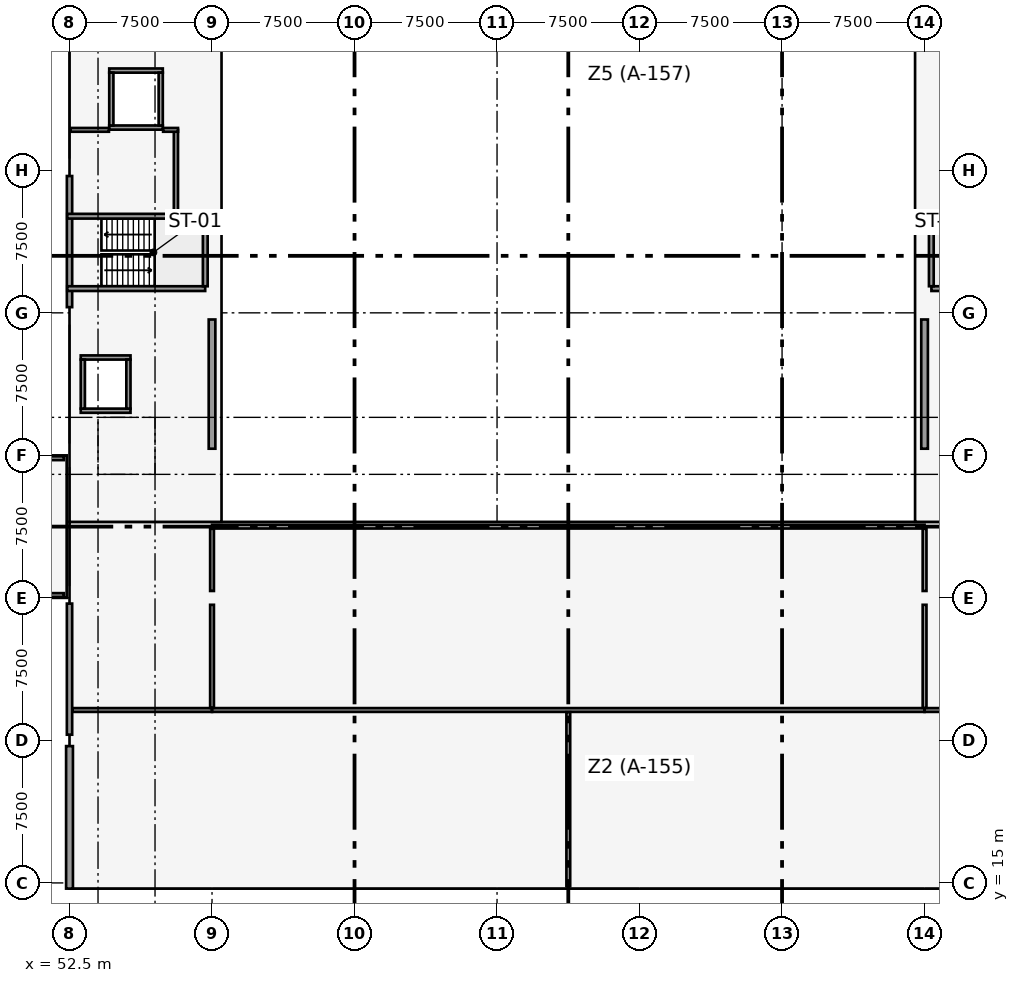
"""IFC4 building model, lengths in metres.
Left out: names, types, materials, properties, quantities, classifications, styles, units other than length and angle.
Written with IfcOpenShell. Run it as: python <this file> out.ifc"""

import sys

from ifc_helpers import new_model, si_unit, direction, frame, frame_2d, origin, origin_2d, place, context, subcontext, project, spatial, rectangle, extrude, element, fill, save


model = new_model("IFC4")
c1 = context("Model", 3, precision=1e-05, world=origin(), true_north=direction((0.0, 1.0)))
c2 = subcontext(c1, "Body", "Model", "MODEL_VIEW")
j1 = project(units=[si_unit("LENGTHUNIT", "METRE"), si_unit("PLANEANGLEUNIT", "RADIAN")], contexts=[c1])
p1 = place(None, origin())
s1 = spatial("IfcSite", under=j1, at=p1, CompositionType="ELEMENT")
p2 = place(p1, origin())
s2 = spatial("IfcBuilding", under=s1, at=p2, CompositionType="ELEMENT")
p3 = place(p2, frame((0.0, 0.0, 17.1)))
s3 = spatial("IfcBuildingStorey", under=s2, at=p3, CompositionType="ELEMENT", Elevation=17.1)
p4 = place(p3, frame((52.5, 22.5, 0.0), z_axis=(0.0, 0.0, 1.0), x_axis=(1.0, 0.0, 0.0)))
e1 = element("IfcColumn", 1, at=p4, inside=s3, PredefinedType="COLUMN", context=c2, shape_type="SweptSolid", body=[
    extrude(rectangle(XDim=0.6, YDim=1.1, at=origin_2d()), origin(), (0.0, 0.0, 1.0), 3.9),
])
for number, where, z_axis, x_axis in (
    (2, (52.5, 30.0, 0.0), (0.0, 0.0, 1.0), (1.0, 0.0, 0.0)),
    (3, (52.5, 37.5, 0.0), (0.0, 0.0, 1.0), (1.0, 0.0, 0.0)),
    (4, (52.5, 45.0, 0.0), (0.0, 0.0, 1.0), (1.0, 0.0, 0.0)),
    (5, (52.5, 52.5, 0.0), (0.0, 0.0, 1.0), (1.0, 0.0, 0.0)),
    (6, (60.0, 22.5, 0.0), (0.0, 0.0, 1.0), (1.0, 0.0, 0.0)),
    (7, (60.0, 30.0, 0.0), (0.0, 0.0, 1.0), (1.0, 0.0, 0.0)),
    (8, (60.0, 37.5, 0.0), (0.0, 0.0, 1.0), (1.0, 0.0, 0.0)),
    (9, (60.0, 45.0, 0.0), (0.0, 0.0, 1.0), (1.0, 0.0, 0.0)),
    (10, (60.0, 52.5, 0.0), (0.0, 0.0, 1.0), (1.0, 0.0, 0.0)),
    (11, (75.0, 22.5, 0.0), (0.0, 0.0, 1.0), (1.0, 0.0, 0.0)),
    (12, (75.0, 30.0, 0.0), (0.0, 0.0, 1.0), (1.0, 0.0, 0.0)),
    (13, (90.0, 22.5, 0.0), (0.0, 0.0, 1.0), (1.0, 0.0, 0.0)),
    (14, (90.0, 30.0, 0.0), (0.0, 0.0, 1.0), (1.0, 0.0, 0.0)),
    (15, (97.5, 22.5, 0.0), (0.0, 0.0, 1.0), (1.0, 0.0, 0.0)),
    (16, (97.5, 30.0, 0.0), (0.0, 0.0, 1.0), (1.0, 0.0, 0.0)),
    (17, (97.5, 37.5, 0.0), (0.0, 0.0, 1.0), (1.0, 0.0, 0.0)),
    (18, (97.5, 45.0, 0.0), (0.0, 0.0, 1.0), (1.0, 0.0, 0.0)),
    (19, (97.5, 52.5, 0.0), (0.0, 0.0, 1.0), (1.0, 0.0, 0.0)),
):
    element("IfcColumn", number, at=place(p3, frame(where, z_axis=z_axis, x_axis=x_axis)), inside=s3, PredefinedType="COLUMN", context=c2, shape_type="SweptSolid", body=[
        extrude(rectangle(XDim=0.7, YDim=0.7, at=origin_2d()), origin(), (0.0, 0.0, 1.0), 3.9),
    ])
for number, where, z_axis, x_axis in (
    (20, (60.0, 37.85, 0.0), (0.0, 0.0, 1.0), (0.0, 1.0, 0.0)),
    (21, (97.5, 37.85, 0.0), (0.0, 0.0, 1.0), (0.0, 1.0, 0.0)),
):
    element("IfcWall", number, at=place(p3, frame(where, z_axis=z_axis, x_axis=x_axis)), inside=s3, PredefinedType="SHEAR", context=c2, shape_type="SweptSolid", body=[
        extrude(rectangle(XDim=6.8, YDim=0.35, at=frame_2d((3.4, 0.0))), origin(), (0.0, 0.0, 1.0), 2.42),
    ])
p5 = place(p3, frame((52.5, 14.7, 0.0), z_axis=(0.0, 0.0, 1.0), x_axis=(0.0, 1.0, 0.0)))
e22 = element("IfcWall", 22, at=p5, inside=s3, PredefinedType="SOLIDWALL", context=c2, shape_type="SweptSolid", body=[
    extrude(rectangle(XDim=7.5, YDim=0.36, at=frame_2d((3.75, 0.0))), origin(), (0.0, 0.0, 1.0), 2.39),
])
p6 = place(p3, frame((52.5, 22.8, 0.0), z_axis=(0.0, 0.0, 1.0), x_axis=(0.0, 1.0, 0.0)))
e23 = element("IfcWall", 23, at=p6, inside=s3, PredefinedType="SOLIDWALL", context=c2, shape_type="SweptSolid", body=[
    extrude(rectangle(XDim=6.9, YDim=0.28, at=frame_2d((3.45, 0.0))), origin(), (0.0, 0.0, 1.0), 2.39),
])
p7 = place(p3, frame((52.5, 45.3, 0.0), z_axis=(0.0, 0.0, 1.0), x_axis=(0.0, 1.0, 0.0)))
e24 = element("IfcWall", 24, at=p7, inside=s3, PredefinedType="SOLIDWALL", context=c2, shape_type="SweptSolid", body=[
    extrude(rectangle(XDim=6.9, YDim=0.28, at=frame_2d((3.45, 0.0))), origin(), (0.0, 0.0, 1.0), 2.64),
])
for number, where, z_axis, x_axis in (
    (25, (37.8, 30.15, 0.55), (0.0, 0.0, 1.0), (1.0, 0.0, 0.0)),
    (26, (37.8, 37.35, 0.55), (0.0, 0.0, 1.0), (1.0, 0.0, 0.0)),
):
    element("IfcWall", number, at=place(p3, frame(where, z_axis=z_axis, x_axis=x_axis)), inside=s3, PredefinedType="PARAPET", context=c2, shape_type="SweptSolid", body=[
        extrude(rectangle(XDim=14.4, YDim=0.2, at=frame_2d((7.2, 0.0))), origin(), (0.0, 0.0, 1.0), 1.12),
    ])
p8 = place(p3, frame((52.38, 46.275, 0.0), z_axis=(0.0, 0.0, 1.0), x_axis=(1.0, 0.0, 0.0)))
e27 = element("IfcWall", 27, at=p8, inside=s3, PredefinedType="SOLIDWALL", context=c2, shape_type="SweptSolid", body=[
    extrude(rectangle(XDim=7.26, YDim=0.25, at=frame_2d((3.63, 0.0))), origin(), (0.0, 0.0, 1.0), 3.62),
])
p9 = place(p8, frame((0.62, 0.0, 0.0)))
e28 = element("IfcOpeningElement", 28, at=p9, cuts=e27, PredefinedType="OPENING", context=c2, shape_type="SweptSolid", body=[
    extrude(rectangle(XDim=1.1, YDim=2.15, at=frame_2d((0.55, 1.075))), frame((0.0, 0.135, 0.0), z_axis=(0.0, -1.0, 0.0), x_axis=(1.0, 0.0, 0.0)), (0.0, 0.0, 1.0), 0.27),
])
p10 = place(p3, frame((52.38, 50.085, 0.0), z_axis=(0.0, 0.0, 1.0), x_axis=(1.0, 0.0, 0.0)))
e29 = element("IfcWall", 29, at=p10, inside=s3, PredefinedType="SOLIDWALL", context=c2, shape_type="SweptSolid", body=[
    extrude(rectangle(XDim=7.26, YDim=0.25, at=frame_2d((3.63, 0.0))), origin(), (0.0, 0.0, 1.0), 3.62),
])
p11 = place(p10, frame((0.62, 0.0, 0.0)))
e30 = element("IfcOpeningElement", 30, at=p11, cuts=e29, PredefinedType="OPENING", context=c2, shape_type="SweptSolid", body=[
    extrude(rectangle(XDim=1.1, YDim=2.15, at=frame_2d((0.55, 1.075))), frame((0.0, 0.135, 0.0), z_axis=(0.0, -1.0, 0.0), x_axis=(1.0, 0.0, 0.0)), (0.0, 0.0, 1.0), 0.27),
])
p12 = place(p3, frame((59.645, 46.4, 0.0), z_axis=(0.0, 0.0, 1.0), x_axis=(0.0, 1.0, 0.0)))
e31 = element("IfcWall", 31, at=p12, inside=s3, PredefinedType="SOLIDWALL", context=c2, shape_type="SweptSolid", body=[
    extrude(rectangle(XDim=3.56, YDim=0.25, at=frame_2d((1.78, 0.0))), origin(), (0.0, 0.0, 1.0), 3.62),
])
p13 = place(p3, frame((97.86, 46.275, 0.0), z_axis=(0.0, 0.0, 1.0), x_axis=(1.0, 0.0, 0.0)))
e32 = element("IfcWall", 32, at=p13, inside=s3, PredefinedType="SOLIDWALL", context=c2, shape_type="SweptSolid", body=[
    extrude(rectangle(XDim=7.26, YDim=0.25, at=frame_2d((3.63, 0.0))), origin(), (0.0, 0.0, 1.0), 3.62),
])
p14 = place(p13, frame((5.54, 0.0, 0.0)))
e33 = element("IfcOpeningElement", 33, at=p14, cuts=e32, PredefinedType="OPENING", context=c2, shape_type="SweptSolid", body=[
    extrude(rectangle(XDim=1.1, YDim=2.15, at=frame_2d((0.55, 1.075))), frame((0.0, 0.135, 0.0), z_axis=(0.0, -1.0, 0.0), x_axis=(1.0, 0.0, 0.0)), (0.0, 0.0, 1.0), 0.27),
])
p15 = place(p3, frame((97.86, 50.085, 0.0), z_axis=(0.0, 0.0, 1.0), x_axis=(1.0, 0.0, 0.0)))
e34 = element("IfcWall", 34, at=p15, inside=s3, PredefinedType="SOLIDWALL", context=c2, shape_type="SweptSolid", body=[
    extrude(rectangle(XDim=7.26, YDim=0.25, at=frame_2d((3.63, 0.0))), origin(), (0.0, 0.0, 1.0), 3.62),
])
p16 = place(p15, frame((5.54, 0.0, 0.0)))
e35 = element("IfcOpeningElement", 35, at=p16, cuts=e34, PredefinedType="OPENING", context=c2, shape_type="SweptSolid", body=[
    extrude(rectangle(XDim=1.1, YDim=2.15, at=frame_2d((0.55, 1.075))), frame((0.0, 0.135, 0.0), z_axis=(0.0, -1.0, 0.0), x_axis=(1.0, 0.0, 0.0)), (0.0, 0.0, 1.0), 0.27),
])
p17 = place(p3, frame((97.855, 46.4, 0.0), z_axis=(0.0, 0.0, 1.0), x_axis=(0.0, 1.0, 0.0)))
e36 = element("IfcWall", 36, at=p17, inside=s3, PredefinedType="SOLIDWALL", context=c2, shape_type="SweptSolid", body=[
    extrude(rectangle(XDim=3.56, YDim=0.25, at=frame_2d((1.78, 0.0))), origin(), (0.0, 0.0, 1.0), 3.62),
])
for number, where, z_axis, x_axis in (
    (37, (53.09, 39.85, 0.0), (0.0, 0.0, 1.0), (1.0, 0.0, 0.0)),
    (38, (53.09, 42.65, 0.0), (0.0, 0.0, 1.0), (1.0, 0.0, 0.0)),
):
    element("IfcWall", number, at=place(p3, frame(where, z_axis=z_axis, x_axis=x_axis)), inside=s3, PredefinedType="SOLIDWALL", context=c2, shape_type="SweptSolid", body=[
        extrude(rectangle(XDim=2.62, YDim=0.22, at=frame_2d((1.31, 0.0))), origin(), (0.0, 0.0, 1.0), 3.62),
    ])
p18 = place(p3, frame((53.2, 39.96, 0.0), z_axis=(0.0, 0.0, 1.0), x_axis=(0.0, 1.0, 0.0)))
e39 = element("IfcWall", 39, at=p18, inside=s3, PredefinedType="SOLIDWALL", context=c2, shape_type="SweptSolid", body=[
    extrude(rectangle(XDim=2.58, YDim=0.22, at=frame_2d((1.29, 0.0))), origin(), (0.0, 0.0, 1.0), 3.62),
])
p19 = place(p3, frame((55.6, 39.96, 0.0), z_axis=(0.0, 0.0, 1.0), x_axis=(0.0, 1.0, 0.0)))
e40 = element("IfcWall", 40, at=p19, inside=s3, PredefinedType="SOLIDWALL", context=c2, shape_type="SweptSolid", body=[
    extrude(rectangle(XDim=2.58, YDim=0.22, at=frame_2d((1.29, 0.0))), origin(), (0.0, 0.0, 1.0), 3.62),
])
p20 = place(p19, frame((0.79, 0.0, 0.0)))
e41 = element("IfcOpeningElement", 41, at=p20, cuts=e40, PredefinedType="OPENING", context=c2, shape_type="SweptSolid", body=[
    extrude(rectangle(XDim=1.0, YDim=2.15, at=frame_2d((0.5, 1.075))), frame((0.0, 0.12, 0.0), z_axis=(0.0, -1.0, 0.0), x_axis=(1.0, 0.0, 0.0)), (0.0, 0.0, 1.0), 0.24),
])
p21 = place(p3, frame((54.59, 54.75, 0.0), z_axis=(0.0, 0.0, 1.0), x_axis=(1.0, 0.0, 0.0)))
e42 = element("IfcWall", 42, at=p21, inside=s3, PredefinedType="SOLIDWALL", context=c2, shape_type="SweptSolid", body=[
    extrude(rectangle(XDim=2.82, YDim=0.22, at=frame_2d((1.41, 0.0))), origin(), (0.0, 0.0, 1.0), 3.62),
])
p22 = place(p21, frame((0.86, 0.0, 0.0)))
e43 = element("IfcOpeningElement", 43, at=p22, cuts=e42, PredefinedType="OPENING", context=c2, shape_type="SweptSolid", body=[
    extrude(rectangle(XDim=1.1, YDim=2.15, at=frame_2d((0.55, 1.075))), frame((0.0, 0.12, 0.0), z_axis=(0.0, -1.0, 0.0), x_axis=(1.0, 0.0, 0.0)), (0.0, 0.0, 1.0), 0.24),
])
p23 = place(p3, frame((54.59, 57.75, 0.0), z_axis=(0.0, 0.0, 1.0), x_axis=(1.0, 0.0, 0.0)))
e44 = element("IfcWall", 44, at=p23, inside=s3, PredefinedType="SOLIDWALL", context=c2, shape_type="SweptSolid", body=[
    extrude(rectangle(XDim=2.82, YDim=0.22, at=frame_2d((1.41, 0.0))), origin(), (0.0, 0.0, 1.0), 3.62),
])
for number, where, z_axis, x_axis in (
    (45, (54.7, 54.86, 0.0), (0.0, 0.0, 1.0), (0.0, 1.0, 0.0)),
    (46, (57.3, 54.86, 0.0), (0.0, 0.0, 1.0), (0.0, 1.0, 0.0)),
):
    element("IfcWall", number, at=place(p3, frame(where, z_axis=z_axis, x_axis=x_axis)), inside=s3, PredefinedType="SOLIDWALL", context=c2, shape_type="SweptSolid", body=[
        extrude(rectangle(XDim=2.78, YDim=0.22, at=frame_2d((1.39, 0.0))), origin(), (0.0, 0.0, 1.0), 3.62),
    ])
p24 = place(p3, frame((58.1, 50.22, 0.0), z_axis=(0.0, 0.0, 1.0), x_axis=(0.0, 1.0, 0.0)))
e47 = element("IfcWall", 47, at=p24, inside=s3, PredefinedType="SOLIDWALL", context=c2, shape_type="SweptSolid", body=[
    extrude(rectangle(XDim=4.41, YDim=0.22, at=frame_2d((2.205, 0.0))), origin(), (0.0, 0.0, 1.0), 3.62),
])
p25 = place(p24, frame((0.45, 0.0, 0.0)))
e48 = element("IfcOpeningElement", 48, at=p25, cuts=e47, PredefinedType="OPENING", context=c2, shape_type="SweptSolid", body=[
    extrude(rectangle(XDim=1.1, YDim=2.15, at=frame_2d((0.55, 1.075))), frame((0.0, 0.12, 0.0), z_axis=(0.0, -1.0, 0.0), x_axis=(1.0, 0.0, 0.0)), (0.0, 0.0, 1.0), 0.24),
])
p26 = place(p3, frame((52.56, 54.63, 0.0), z_axis=(0.0, 0.0, 1.0), x_axis=(1.0, 0.0, 0.0)))
e49 = element("IfcWall", 49, at=p26, inside=s3, PredefinedType="PARTITIONING", context=c2, shape_type="SweptSolid", body=[
    extrude(rectangle(XDim=2.015, YDim=0.2, at=frame_2d((1.007, 0.0))), origin(), (0.0, 0.0, 1.0), 2.85),
])
p27 = place(p3, frame((57.425, 54.63, 0.0), z_axis=(0.0, 0.0, 1.0), x_axis=(1.0, 0.0, 0.0)))
e50 = element("IfcWall", 50, at=p27, inside=s3, PredefinedType="PARTITIONING", context=c2, shape_type="SweptSolid", body=[
    extrude(rectangle(XDim=0.785, YDim=0.2, at=frame_2d((0.393, 0.0))), origin(), (0.0, 0.0, 1.0), 3.6),
])
p28 = place(p3, frame((52.654, 24.1, 0.0), z_axis=(0.0, 0.0, 1.0), x_axis=(1.0, 0.0, 0.0)))
e51 = element("IfcWall", 51, at=p28, inside=s3, PredefinedType="PARTITIONING", context=c2, shape_type="SweptSolid", body=[
    extrude(rectangle(XDim=7.346, YDim=0.2, at=frame_2d((3.673, 0.0))), origin(), (0.0, 0.0, 1.0), 2.39),
])
p29 = place(p28, frame((2.996, 0.0, 0.0)))
e52 = element("IfcOpeningElement", 52, at=p29, cuts=e51, PredefinedType="OPENING", context=c2, shape_type="SweptSolid", body=[
    extrude(rectangle(XDim=1.2, YDim=2.15, at=frame_2d((0.6, 1.075))), frame((0.0, 0.11, 0.0), z_axis=(0.0, -1.0, 0.0), x_axis=(1.0, 0.0, 0.0)), (0.0, 0.0, 1.0), 0.22),
])
p30 = place(p3, frame((97.5, 24.1, 0.0), z_axis=(0.0, 0.0, 1.0), x_axis=(1.0, 0.0, 0.0)))
e53 = element("IfcWall", 53, at=p30, inside=s3, PredefinedType="PARTITIONING", context=c2, shape_type="SweptSolid", body=[
    extrude(rectangle(XDim=7.346, YDim=0.2, at=frame_2d((3.673, 0.0))), origin(), (0.0, 0.0, 1.0), 2.39),
])
p31 = place(p30, frame((3.15, 0.0, 0.0)))
e54 = element("IfcOpeningElement", 54, at=p31, cuts=e53, PredefinedType="OPENING", context=c2, shape_type="SweptSolid", body=[
    extrude(rectangle(XDim=1.2, YDim=2.15, at=frame_2d((0.6, 1.075))), frame((0.0, 0.11, 0.0), z_axis=(0.0, -1.0, 0.0), x_axis=(1.0, 0.0, 0.0)), (0.0, 0.0, 1.0), 0.22),
])
for number, where, z_axis, x_axis in (
    (55, (60.0, 24.1, 0.0), (0.0, 0.0, 1.0), (1.0, 0.0, 0.0)),
    (56, (60.0, 33.75, 0.0), (0.0, 0.0, 1.0), (1.0, 0.0, 0.0)),
):
    element("IfcWall", number, at=place(p3, frame(where, z_axis=z_axis, x_axis=x_axis)), inside=s3, PredefinedType="PARTITIONING", context=c2, shape_type="SweptSolid", body=[
        extrude(rectangle(XDim=37.5, YDim=0.2, at=frame_2d((18.75, 0.0))), origin(), (0.0, 0.0, 1.0), 2.39),
    ])
p32 = place(p3, frame((78.75, 14.832, 0.0), z_axis=(0.0, 0.0, 1.0), x_axis=(0.0, 1.0, 0.0)))
e57 = element("IfcWall", 57, at=p32, inside=s3, PredefinedType="PARTITIONING", context=c2, shape_type="SweptSolid", body=[
    extrude(rectangle(XDim=9.154, YDim=0.2, at=frame_2d((4.577, 0.0))), origin(), (0.0, 0.0, 1.0), 2.59),
])
p33 = place(p32, frame((3.718, 0.0, 0.0)))
e58 = element("IfcOpeningElement", 58, at=p33, cuts=e57, PredefinedType="OPENING", context=c2, shape_type="SweptSolid", body=[
    extrude(rectangle(XDim=1.3, YDim=2.15, at=frame_2d((0.65, 1.075))), frame((0.0, 0.11, 0.0), z_axis=(0.0, -1.0, 0.0), x_axis=(1.0, 0.0, 0.0)), (0.0, 0.0, 1.0), 0.22),
])
p34 = place(p3, frame((60.0, 24.214, 0.0), z_axis=(0.0, 0.0, 1.0), x_axis=(0.0, 1.0, 0.0)))
e59 = element("IfcWall", 59, at=p34, inside=s3, PredefinedType="PARTITIONING", context=c2, shape_type="SweptSolid", body=[
    extrude(rectangle(XDim=5.422, YDim=0.2, at=frame_2d((2.711, 0.0))), origin(), (0.0, 0.0, 1.0), 2.39),
])
p35 = place(p34, frame((2.186, 0.0, 0.0)))
e60 = element("IfcOpeningElement", 60, at=p35, cuts=e59, PredefinedType="OPENING", context=c2, shape_type="SweptSolid", body=[
    extrude(rectangle(XDim=1.2, YDim=2.15, at=frame_2d((0.6, 1.075))), frame((0.0, 0.11, 0.0), z_axis=(0.0, -1.0, 0.0), x_axis=(1.0, 0.0, 0.0)), (0.0, 0.0, 1.0), 0.22),
])
p36 = place(p3, frame((60.0, 30.364, 0.0), z_axis=(0.0, 0.0, 1.0), x_axis=(0.0, 1.0, 0.0)))
e61 = element("IfcWall", 61, at=p36, inside=s3, PredefinedType="PARTITIONING", context=c2, shape_type="SweptSolid", body=[
    extrude(rectangle(XDim=3.272, YDim=0.2, at=frame_2d((1.636, 0.0))), origin(), (0.0, 0.0, 1.0), 2.39),
])
p37 = place(p3, frame((97.5, 24.214, 0.0), z_axis=(0.0, 0.0, 1.0), x_axis=(0.0, 1.0, 0.0)))
e62 = element("IfcWall", 62, at=p37, inside=s3, PredefinedType="PARTITIONING", context=c2, shape_type="SweptSolid", body=[
    extrude(rectangle(XDim=5.422, YDim=0.2, at=frame_2d((2.711, 0.0))), origin(), (0.0, 0.0, 1.0), 2.39),
])
p38 = place(p37, frame((2.186, 0.0, 0.0)))
e63 = element("IfcOpeningElement", 63, at=p38, cuts=e62, PredefinedType="OPENING", context=c2, shape_type="SweptSolid", body=[
    extrude(rectangle(XDim=1.2, YDim=2.15, at=frame_2d((0.6, 1.075))), frame((0.0, 0.11, 0.0), z_axis=(0.0, -1.0, 0.0), x_axis=(1.0, 0.0, 0.0)), (0.0, 0.0, 1.0), 0.22),
])
p39 = place(p3, frame((97.5, 30.364, 0.0), z_axis=(0.0, 0.0, 1.0), x_axis=(0.0, 1.0, 0.0)))
e64 = element("IfcWall", 64, at=p39, inside=s3, PredefinedType="PARTITIONING", context=c2, shape_type="SweptSolid", body=[
    extrude(rectangle(XDim=3.272, YDim=0.2, at=frame_2d((1.636, 0.0))), origin(), (0.0, 0.0, 1.0), 2.39),
])
p40 = place(p9, origin())
e65 = element("IfcDoor", 65, at=p40, inside=s3, OperationType="SINGLE_SWING_LEFT", PredefinedType="DOOR", context=c2, shape_type="SweptSolid", body=[
    extrude(rectangle(XDim=1.1, YDim=2.15, at=frame_2d((0.55, 1.075))), frame((0.0, 0.025, 0.0), z_axis=(0.0, -1.0, 0.0), x_axis=(1.0, 0.0, 0.0)), (0.0, 0.0, 1.0), 0.05),
])
fill(e28, e65)
p41 = place(p11, frame((1.1, 0.0, 0.0), z_axis=(0.0, 0.0, 1.0), x_axis=(-1.0, 0.0, 0.0)))
e66 = element("IfcDoor", 66, at=p41, inside=s3, OperationType="SINGLE_SWING_RIGHT", PredefinedType="DOOR", context=c2, shape_type="SweptSolid", body=[
    extrude(rectangle(XDim=1.1, YDim=2.15, at=frame_2d((0.55, 1.075))), frame((0.0, 0.025, 0.0), z_axis=(0.0, -1.0, 0.0), x_axis=(1.0, 0.0, 0.0)), (0.0, 0.0, 1.0), 0.05),
])
fill(e30, e66)
p42 = place(p20, origin())
e67 = element("IfcDoor", 67, at=p42, inside=s3, OperationType="SLIDING_TO_LEFT", PredefinedType="DOOR", context=c2, shape_type="SweptSolid", body=[
    extrude(rectangle(XDim=1.0, YDim=2.15, at=frame_2d((0.5, 1.075))), frame((0.0, 0.025, 0.0), z_axis=(0.0, -1.0, 0.0), x_axis=(1.0, 0.0, 0.0)), (0.0, 0.0, 1.0), 0.05),
])
fill(e41, e67)
p43 = place(p22, origin())
e68 = element("IfcDoor", 68, at=p43, inside=s3, OperationType="SLIDING_TO_LEFT", PredefinedType="DOOR", context=c2, shape_type="SweptSolid", body=[
    extrude(rectangle(XDim=1.1, YDim=2.15, at=frame_2d((0.55, 1.075))), frame((0.0, 0.025, 0.0), z_axis=(0.0, -1.0, 0.0), x_axis=(1.0, 0.0, 0.0)), (0.0, 0.0, 1.0), 0.05),
])
fill(e43, e68)
p44 = place(p25, origin())
e69 = element("IfcDoor", 69, at=p44, inside=s3, OperationType="SINGLE_SWING_RIGHT", PredefinedType="DOOR", context=c2, shape_type="SweptSolid", body=[
    extrude(rectangle(XDim=1.1, YDim=2.15, at=frame_2d((0.55, 1.075))), frame((0.0, 0.025, 0.0), z_axis=(0.0, -1.0, 0.0), x_axis=(1.0, 0.0, 0.0)), (0.0, 0.0, 1.0), 0.05),
])
fill(e48, e69)
p45 = place(p29, origin())
e70 = element("IfcDoor", 70, at=p45, inside=s3, OperationType="SINGLE_SWING_RIGHT", PredefinedType="DOOR", context=c2, shape_type="SweptSolid", body=[
    extrude(rectangle(XDim=1.2, YDim=2.15, at=frame_2d((0.6, 1.075))), frame((0.0, 0.025, 0.0), z_axis=(0.0, -1.0, 0.0), x_axis=(1.0, 0.0, 0.0)), (0.0, 0.0, 1.0), 0.05),
])
fill(e52, e70)
p46 = place(p33, origin())
e71 = element("IfcDoor", 71, at=p46, inside=s3, OperationType="SINGLE_SWING_RIGHT", PredefinedType="DOOR", context=c2, shape_type="SweptSolid", body=[
    extrude(rectangle(XDim=1.3, YDim=2.15, at=frame_2d((0.65, 1.075))), frame((0.0, 0.025, 0.0), z_axis=(0.0, -1.0, 0.0), x_axis=(1.0, 0.0, 0.0)), (0.0, 0.0, 1.0), 0.05),
])
fill(e58, e71)
p47 = place(p35, origin())
e72 = element("IfcDoor", 72, at=p47, inside=s3, OperationType="SINGLE_SWING_LEFT", PredefinedType="DOOR", context=c2, shape_type="SweptSolid", body=[
    extrude(rectangle(XDim=1.2, YDim=2.15, at=frame_2d((0.6, 1.075))), frame((0.0, 0.025, 0.0), z_axis=(0.0, -1.0, 0.0), x_axis=(1.0, 0.0, 0.0)), (0.0, 0.0, 1.0), 0.05),
])
fill(e60, e72)
p48 = place(p38, origin())
e73 = element("IfcDoor", 73, at=p48, inside=s3, OperationType="SINGLE_SWING_RIGHT", PredefinedType="DOOR", context=c2, shape_type="SweptSolid", body=[
    extrude(rectangle(XDim=1.2, YDim=2.15, at=frame_2d((0.6, 1.075))), frame((0.0, 0.025, 0.0), z_axis=(0.0, -1.0, 0.0), x_axis=(1.0, 0.0, 0.0)), (0.0, 0.0, 1.0), 0.05),
])
fill(e63, e73)
save(model, sys.argv[1])
